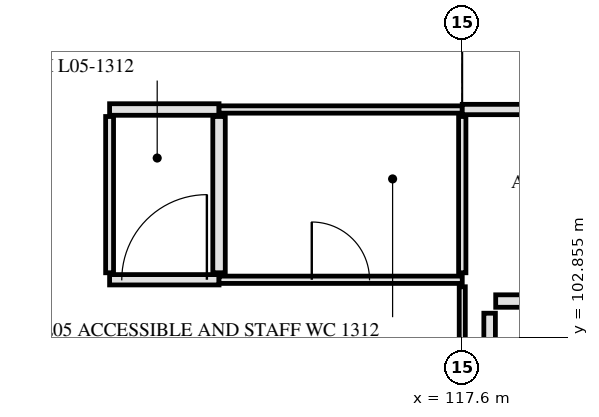
"""IFC4 building model, lengths in metres.
Left out: names, types, materials, properties, quantities, classifications, styles, units other than length and angle.
Written with IfcOpenShell. Run it as: python <this file> out.ifc"""

import sys

from ifc_helpers import new_model, si_unit, direction, frame, frame_2d, origin, place, context, subcontext, project, spatial, rectangle, extrude, element, fill, save


model = new_model("IFC4")
c1 = context("Model", 3, precision=1e-05, world=origin(), true_north=direction((0.0, 1.0)))
c2 = subcontext(c1, "Body", "Model", "MODEL_VIEW")
j1 = project(units=[si_unit("LENGTHUNIT", "METRE"), si_unit("PLANEANGLEUNIT", "RADIAN")], contexts=[c1])
p1 = place(None, origin())
s1 = spatial("IfcSite", under=j1, at=p1, CompositionType="ELEMENT")
p2 = place(p1, origin())
s2 = spatial("IfcBuilding", under=s1, at=p2, CompositionType="ELEMENT")
p3 = place(p2, frame((0.0, 0.0, 22.5)))
s3 = spatial("IfcBuildingStorey", under=s2, at=p3, CompositionType="ELEMENT", Elevation=22.5)
p4 = place(p3, frame((118.15, 103.45, 0.0), z_axis=(0.0, 0.0, 1.0), x_axis=(1.0, 0.0, 0.0)))
e1 = element("IfcWall", 1, at=p4, inside=s3, PredefinedType="PARTITIONING", context=c2, shape_type="SweptSolid", body=[
    extrude(rectangle(XDim=7.85, YDim=0.205, at=frame_2d((3.925, 0.0))), origin(), (0.0, 0.0, 1.0), 3.3),
])
p5 = place(p4, frame((3.4, 0.0, 0.0)))
e2 = element("IfcOpeningElement", 2, at=p5, cuts=e1, PredefinedType="OPENING", context=c2, shape_type="SweptSolid", body=[
    extrude(rectangle(XDim=1.05, YDim=2.15, at=frame_2d((0.525, 1.075))), frame((0.0, 0.113, 0.0), z_axis=(0.0, -1.0, 0.0), x_axis=(1.0, 0.0, 0.0)), (0.0, 0.0, 1.0), 0.225),
])
p6 = place(p3, frame((111.8, 103.8, 0.0), z_axis=(0.0, 0.0, 1.0), x_axis=(1.0, 0.0, 0.0)))
e3 = element("IfcWall", 3, at=p6, inside=s3, PredefinedType="PARTITIONING", context=c2, shape_type="SweptSolid", body=[
    extrude(rectangle(XDim=1.8, YDim=0.17, at=frame_2d((0.9, 0.0))), origin(), (0.0, 0.0, 1.0), 3.61),
])
p7 = place(p6, frame((0.2, 0.0, 0.0)))
e4 = element("IfcOpeningElement", 4, at=p7, cuts=e3, PredefinedType="OPENING", context=c2, shape_type="SweptSolid", body=[
    extrude(rectangle(XDim=1.4, YDim=2.2, at=frame_2d((0.7, 1.1))), frame((0.0, 0.095, 0.0), z_axis=(0.0, -1.0, 0.0), x_axis=(1.0, 0.0, 0.0)), (0.0, 0.0, 1.0), 0.19),
])
p8 = place(p3, frame((113.6, 103.8, 0.0), z_axis=(0.0, 0.0, 1.0), x_axis=(1.0, 0.0, 0.0)))
e5 = element("IfcWall", 5, at=p8, inside=s3, PredefinedType="PARTITIONING", context=c2, shape_type="SweptSolid", body=[
    extrude(rectangle(XDim=4.0, YDim=0.12, at=frame_2d((2.0, 0.0))), origin(), (0.0, 0.0, 1.0), 3.3),
])
p9 = place(p8, frame((1.525, 0.0, 0.0)))
e6 = element("IfcOpeningElement", 6, at=p9, cuts=e5, PredefinedType="OPENING", context=c2, shape_type="SweptSolid", body=[
    extrude(rectangle(XDim=0.95, YDim=2.1, at=frame_2d((0.475, 1.05))), frame((0.0, 0.07, 0.0), z_axis=(0.0, -1.0, 0.0), x_axis=(1.0, 0.0, 0.0)), (0.0, 0.0, 1.0), 0.14),
])
p10 = place(p3, frame((111.8, 106.6, 0.0), z_axis=(0.0, 0.0, 1.0), x_axis=(1.0, 0.0, 0.0)))
e7 = element("IfcWall", 7, at=p10, inside=s3, PredefinedType="PARTITIONING", context=c2, shape_type="SweptSolid", body=[
    extrude(rectangle(XDim=1.8, YDim=0.19, at=frame_2d((0.9, 0.0))), origin(), (0.0, 0.0, 1.0), 3.61),
])
p11 = place(p3, frame((113.6, 106.6, 0.0), z_axis=(0.0, 0.0, 1.0), x_axis=(1.0, 0.0, 0.0)))
e8 = element("IfcWall", 8, at=p11, inside=s3, PredefinedType="PARTITIONING", context=c2, shape_type="SweptSolid", body=[
    extrude(rectangle(XDim=4.0, YDim=0.12, at=frame_2d((2.0, 0.0))), origin(), (0.0, 0.0, 1.0), 3.3),
])
p12 = place(p3, frame((117.6, 106.6, 0.0), z_axis=(0.0, 0.0, 1.0), x_axis=(1.0, 0.0, 0.0)))
e9 = element("IfcWall", 9, at=p12, inside=s3, PredefinedType="PARTITIONING", context=c2, shape_type="SweptSolid", body=[
    extrude(rectangle(XDim=8.4, YDim=0.17, at=frame_2d((4.2, 0.0))), origin(), (0.0, 0.0, 1.0), 3.3),
])
p13 = place(p3, frame((111.8, 103.915, 0.0), z_axis=(0.0, 0.0, 1.0), x_axis=(0.0, 1.0, 0.0)))
e10 = element("IfcWall", 10, at=p13, inside=s3, PredefinedType="PARTITIONING", context=c2, shape_type="SweptSolid", body=[
    extrude(rectangle(XDim=2.57, YDim=0.13, at=frame_2d((1.285, 0.0))), origin(), (0.0, 0.0, 1.0), 3.34),
])
p14 = place(p3, frame((113.6, 103.915, 0.0), z_axis=(0.0, 0.0, 1.0), x_axis=(0.0, 1.0, 0.0)))
e11 = element("IfcWall", 11, at=p14, inside=s3, PredefinedType="PARTITIONING", context=c2, shape_type="SweptSolid", body=[
    extrude(rectangle(XDim=2.57, YDim=0.205, at=frame_2d((1.285, 0.0))), origin(), (0.0, 0.0, 1.0), 3.34),
])
p15 = place(p3, frame((117.6, 101.095, 0.0), z_axis=(0.0, 0.0, 1.0), x_axis=(0.0, 1.0, 0.0)))
e12 = element("IfcWall", 12, at=p15, inside=s3, PredefinedType="PARTITIONING", context=c2, shape_type="SweptSolid", body=[
    extrude(rectangle(XDim=2.59, YDim=0.1, at=frame_2d((1.295, 0.0))), origin(), (0.0, 0.0, 1.0), 3.3),
])
p16 = place(p3, frame((117.6, 103.915, 0.0), z_axis=(0.0, 0.0, 1.0), x_axis=(0.0, 1.0, 0.0)))
e13 = element("IfcWall", 13, at=p16, inside=s3, PredefinedType="PARTITIONING", context=c2, shape_type="SweptSolid", body=[
    extrude(rectangle(XDim=2.57, YDim=0.12, at=frame_2d((1.285, 0.0))), origin(), (0.0, 0.0, 1.0), 3.3),
])
p17 = place(p3, frame((118.05, 101.365, 0.0), z_axis=(0.0, 0.0, 1.0), x_axis=(0.0, 1.0, 0.0)))
e14 = element("IfcWall", 14, at=p17, inside=s3, PredefinedType="PARTITIONING", context=c2, shape_type="SweptSolid", body=[
    extrude(rectangle(XDim=1.885, YDim=0.19, at=frame_2d((0.942, 0.0))), origin(), (0.0, 0.0, 1.0), 3.61),
])
p18 = place(p7, origin())
e15 = element("IfcDoor", 15, at=p18, inside=s3, OperationType="SINGLE_SWING_RIGHT", PredefinedType="DOOR", context=c2, shape_type="SweptSolid", body=[
    extrude(rectangle(XDim=1.4, YDim=2.2, at=frame_2d((0.7, 1.1))), frame((0.0, 0.025, 0.0), z_axis=(0.0, -1.0, 0.0), x_axis=(1.0, 0.0, 0.0)), (0.0, 0.0, 1.0), 0.05),
])
fill(e4, e15)
p19 = place(p9, origin())
e16 = element("IfcDoor", 16, at=p19, inside=s3, OperationType="SINGLE_SWING_LEFT", PredefinedType="DOOR", context=c2, shape_type="SweptSolid", body=[
    extrude(rectangle(XDim=0.95, YDim=2.1, at=frame_2d((0.475, 1.05))), frame((0.0, 0.025, 0.0), z_axis=(0.0, -1.0, 0.0), x_axis=(1.0, 0.0, 0.0)), (0.0, 0.0, 1.0), 0.05),
])
fill(e6, e16)
save(model, sys.argv[1])
